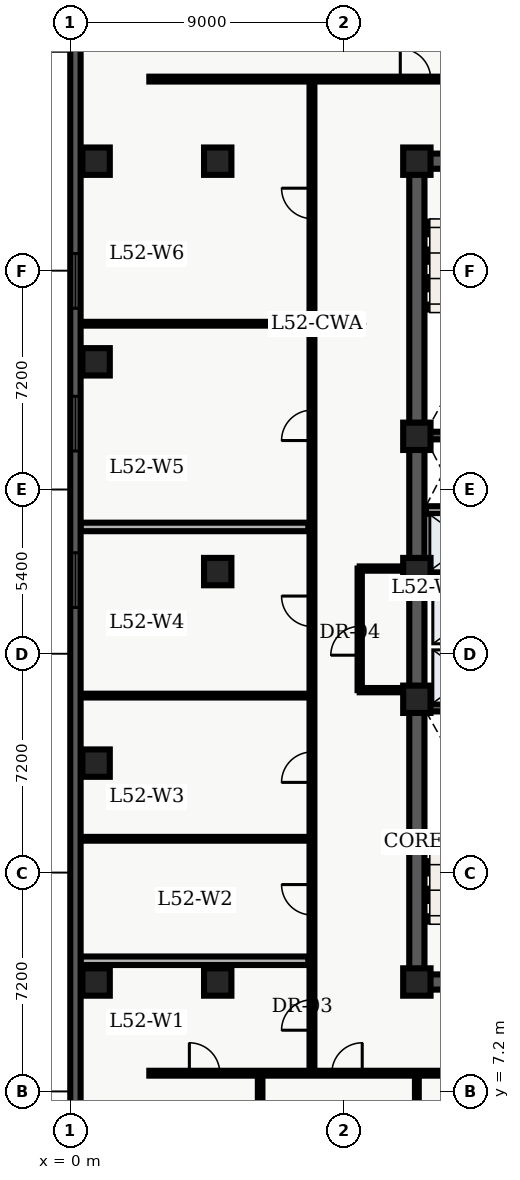
"""IFC4 building model, lengths in metres.
Left out: names, types, materials, properties, quantities, classifications, styles, units other than length and angle.
Written with IfcOpenShell. Run it as: python <this file> out.ifc"""

import sys

from ifc_helpers import new_model, entity, si_unit, converted_unit, direction, frame, origin_with_axes, origin_2d_with_axis, place, context, subcontext, project, spatial, polyline, rectangle, outline, extrude, element, fill, save


model = new_model("IFC4")
c1 = context("Model", 3, precision=1e-05, world=origin_with_axes(), true_north=direction((0.0, 1.0)))
c2 = subcontext(c1, "Body", "Model", "MODEL_VIEW")
j1 = project(units=[si_unit("LENGTHUNIT", "METRE"), converted_unit("PLANEANGLEUNIT", "DEGREE", entity("IfcPlaneAngleMeasure", 0.017), si_unit("PLANEANGLEUNIT", "RADIAN"), dimensions=[0, 0, 0, 0, 0, 0, 0])], contexts=[c1])
p1 = place(None, origin_with_axes())
s1 = spatial("IfcSite", under=j1, at=p1, CompositionType="ELEMENT")
p2 = place(p1, origin_with_axes())
s2 = spatial("IfcBuilding", under=s1, at=p2, CompositionType="ELEMENT")
p3 = place(p2, frame((0.0, 0.0, 212.1), z_axis=(0.0, 0.0, 1.0), x_axis=(1.0, 0.0, 0.0)))
s3 = spatial("IfcBuildingStorey", under=s2, at=p3, CompositionType="ELEMENT", Elevation=212.1)
p4 = place(p3, frame((11.4, 10.8, 0.0), z_axis=(0.0, 0.0, 1.0), x_axis=(0.0, 1.0, 0.0)))
e1 = element("IfcWall", 1, at=p4, inside=s3, PredefinedType="SHEAR", context=c2, shape_type="SweptSolid", body=[
    extrude(outline(polyline([(0.0, -0.25), (27.0, -0.25), (27.0, 0.25), (0.0, 0.25), (0.0, -0.25)])), origin_with_axes(), (0.0, 0.0, 1.0), 3.66),
])
p5 = place(p3, frame((11.4, 10.8, 0.0), z_axis=(0.0, 0.0, 1.0), x_axis=(1.0, 0.0, 0.0)))
e2 = element("IfcWall", 2, at=p5, inside=s3, PredefinedType="SHEAR", context=c2, shape_type="SweptSolid", body=[
    extrude(outline(polyline([(0.0, -0.25), (7.2, -0.25), (7.2, 0.25), (0.0, 0.25), (0.0, -0.25)])), origin_with_axes(), (0.0, 0.0, 1.0), 3.66),
])
p6 = place(p5, frame((2.625, 0.0, 0.0), z_axis=(0.0, 0.0, 1.0), x_axis=(1.0, 0.0, 0.0)))
e3 = element("IfcOpeningElement", 3, at=p6, cuts=e2, PredefinedType="OPENING", context=c2, shape_type="SweptSolid", body=[
    extrude(rectangle(XDim=1.05, YDim=0.52, at=origin_2d_with_axis()), origin_with_axes(), (0.0, 0.0, 1.0), 2.15),
])
p7 = place(p3, frame((11.4, 37.8, 0.0), z_axis=(0.0, 0.0, 1.0), x_axis=(1.0, 0.0, 0.0)))
e4 = element("IfcWall", 4, at=p7, inside=s3, PredefinedType="SHEAR", context=c2, shape_type="SweptSolid", body=[
    extrude(outline(polyline([(0.0, -0.25), (7.2, -0.25), (7.2, 0.25), (0.0, 0.25), (0.0, -0.25)])), origin_with_axes(), (0.0, 0.0, 1.0), 3.66),
])
p8 = place(p7, frame((2.625, 0.0, 0.0), z_axis=(0.0, 0.0, 1.0), x_axis=(1.0, 0.0, 0.0)))
e5 = element("IfcOpeningElement", 5, at=p8, cuts=e4, PredefinedType="OPENING", context=c2, shape_type="SweptSolid", body=[
    extrude(rectangle(XDim=1.05, YDim=0.52, at=origin_2d_with_axis()), origin_with_axes(), (0.0, 0.0, 1.0), 2.15),
])
for number, where, z_axis, x_axis in (
    (6, (11.65, 19.825, 0.0), (0.0, 0.0, 1.0), (1.0, 0.0, 0.0)),
    (7, (11.65, 28.775, 0.0), (0.0, 0.0, 1.0), (1.0, 0.0, 0.0)),
):
    element("IfcWall", number, at=place(p3, frame(where, z_axis=z_axis, x_axis=x_axis)), inside=s3, PredefinedType="SHEAR", context=c2, shape_type="SweptSolid", body=[
        extrude(outline(polyline([(0.0, -0.125), (6.7, -0.125), (6.7, 0.125), (0.0, 0.125), (0.0, -0.125)])), origin_with_axes(), (0.0, 0.0, 1.0), 3.66),
    ])
p9 = place(p3, frame((11.7, 24.1, 0.0), z_axis=(0.0, 0.0, 1.0), x_axis=(1.0, 0.0, 0.0)))
e8 = element("IfcWall", 8, at=p9, inside=s3, PredefinedType="SOLIDWALL", context=c2, shape_type="SweptSolid", body=[
    extrude(outline(polyline([(0.0, -0.125), (6.6, -0.125), (6.6, 0.125), (0.0, 0.125), (0.0, -0.125)])), origin_with_axes(), (0.0, 0.0, 1.0), 2.7),
])
p10 = place(p9, frame((3.75, 0.0, 0.0), z_axis=(0.0, 0.0, 1.0), x_axis=(1.0, 0.0, 0.0)))
e9 = element("IfcOpeningElement", 9, at=p10, cuts=e8, PredefinedType="OPENING", context=c2, shape_type="SweptSolid", body=[
    extrude(rectangle(XDim=0.9, YDim=0.27, at=origin_2d_with_axis()), origin_with_axes(), (0.0, 0.0, 1.0), 2.15),
])
p11 = place(p3, frame((11.7, 26.325, 0.0), z_axis=(0.0, 0.0, 1.0), x_axis=(1.0, 0.0, 0.0)))
e10 = element("IfcWall", 10, at=p11, inside=s3, PredefinedType="SOLIDWALL", context=c2, shape_type="SweptSolid", body=[
    extrude(outline(polyline([(0.0, -0.125), (6.6, -0.125), (6.6, 0.125), (0.0, 0.125), (0.0, -0.125)])), origin_with_axes(), (0.0, 0.0, 1.0), 2.7),
])
p12 = place(p11, frame((3.5, 0.0, 0.0), z_axis=(0.0, 0.0, 1.0), x_axis=(1.0, 0.0, 0.0)))
e11 = element("IfcOpeningElement", 11, at=p12, cuts=e10, PredefinedType="OPENING", context=c2, shape_type="SweptSolid", body=[
    extrude(rectangle(XDim=0.9, YDim=0.27, at=origin_2d_with_axis()), origin_with_axes(), (0.0, 0.0, 1.0), 2.15),
])
for number, where, z_axis, x_axis in (
    (12, (11.4, 10.8, 0.0), (0.0, 0.0, 1.0), (1.0, 0.0, 0.0)),
    (13, (11.4, 20.1, 0.0), (0.0, 0.0, 1.0), (1.0, 0.0, 0.0)),
    (14, (11.4, 24.3, 0.0), (0.0, 0.0, 1.0), (1.0, 0.0, 0.0)),
    (15, (11.4, 28.75, 0.0), (0.0, 0.0, 1.0), (1.0, 0.0, 0.0)),
    (16, (11.4, 37.8, 0.0), (0.0, 0.0, 1.0), (1.0, 0.0, 0.0)),
    (17, (4.85, 10.8, 0.0), (0.0, 0.0, 1.0), (1.0, 0.0, 0.0)),
    (18, (4.85, 24.3, 0.0), (0.0, 0.0, 1.0), (1.0, 0.0, 0.0)),
    (19, (4.85, 37.8, 0.0), (0.0, 0.0, 1.0), (1.0, 0.0, 0.0)),
    (20, (0.85, 10.8, 0.0), (0.0, 0.0, 1.0), (1.0, 0.0, 0.0)),
    (21, (0.85, 18.0, 0.0), (0.0, 0.0, 1.0), (1.0, 0.0, 0.0)),
    (22, (0.85, 31.2, 0.0), (0.0, 0.0, 1.0), (1.0, 0.0, 0.0)),
    (23, (0.85, 37.8, 0.0), (0.0, 0.0, 1.0), (1.0, 0.0, 0.0)),
):
    element("IfcColumn", number, at=place(p3, frame(where, z_axis=z_axis, x_axis=x_axis)), inside=s3, PredefinedType="COLUMN", context=c2, shape_type="SweptSolid", body=[
        extrude(rectangle(XDim=0.9, YDim=0.9, at=origin_2d_with_axis()), origin_with_axes(), (0.0, 0.0, 1.0), 3.9),
    ])
p13 = place(p3, frame((9.52, 20.4, 0.0), z_axis=(0.0, 0.0, 1.0), x_axis=(0.0, 1.0, 0.0)))
e24 = element("IfcWall", 24, at=p13, inside=s3, PredefinedType="PARTITIONING", context=c2, shape_type="SweptSolid", body=[
    extrude(outline(polyline([(0.0, -0.07), (4.0, -0.07), (4.0, 0.07), (0.0, 0.07), (0.0, -0.07)])), origin_with_axes(), (0.0, 0.0, 1.0), 2.7),
])
p14 = place(p13, frame((1.625, 0.0, 0.0), z_axis=(0.0, 0.0, 1.0), x_axis=(1.0, 0.0, 0.0)))
e25 = element("IfcOpeningElement", 25, at=p14, cuts=e24, PredefinedType="OPENING", context=c2, shape_type="SweptSolid", body=[
    extrude(rectangle(XDim=0.95, YDim=0.16, at=origin_2d_with_axis()), origin_with_axes(), (0.0, 0.0, 1.0), 2.15),
])
for number, where, z_axis, x_axis in (
    (26, (9.52, 20.4, 0.0), (0.0, 0.0, 1.0), (1.0, 0.0, 0.0)),
    (27, (9.52, 24.4, 0.0), (0.0, 0.0, 1.0), (1.0, 0.0, 0.0)),
):
    element("IfcWall", number, at=place(p3, frame(where, z_axis=z_axis, x_axis=x_axis)), inside=s3, PredefinedType="PARTITIONING", context=c2, shape_type="SweptSolid", body=[
        extrude(outline(polyline([(0.0, -0.07), (1.58, -0.07), (1.58, 0.07), (0.0, 0.07), (0.0, -0.07)])), origin_with_axes(), (0.0, 0.0, 1.0), 2.7),
    ])
p15 = place(p3, frame((2.6, 7.8, 0.0), z_axis=(0.0, 0.0, 1.0), x_axis=(1.0, 0.0, 0.0)))
e28 = element("IfcWall", 28, at=p15, inside=s3, PredefinedType="PARTITIONING", context=c2, shape_type="SweptSolid", body=[
    extrude(outline(polyline([(0.0, -0.08), (18.55, -0.08), (18.55, 0.08), (0.0, 0.08), (0.0, -0.08)])), origin_with_axes(), (0.0, 0.0, 1.0), 2.7),
])
p16 = place(p15, frame((1.817, 0.0, 0.0), z_axis=(0.0, 0.0, 1.0), x_axis=(1.0, 0.0, 0.0)))
e29 = element("IfcOpeningElement", 29, at=p16, cuts=e28, PredefinedType="OPENING", context=c2, shape_type="SweptSolid", body=[
    extrude(rectangle(XDim=1.0, YDim=0.18, at=origin_2d_with_axis()), origin_with_axes(), (0.0, 0.0, 1.0), 2.15),
])
p17 = place(p15, frame((6.503, 0.0, 0.0), z_axis=(0.0, 0.0, 1.0), x_axis=(1.0, 0.0, 0.0)))
e30 = element("IfcOpeningElement", 30, at=p17, cuts=e28, PredefinedType="OPENING", context=c2, shape_type="SweptSolid", body=[
    extrude(rectangle(XDim=1.0, YDim=0.18, at=origin_2d_with_axis()), origin_with_axes(), (0.0, 0.0, 1.0), 2.15),
])
p18 = place(p15, frame((10.728, 0.0, 0.0), z_axis=(0.0, 0.0, 1.0), x_axis=(1.0, 0.0, 0.0)))
e31 = element("IfcOpeningElement", 31, at=p18, cuts=e28, PredefinedType="OPENING", context=c2, shape_type="SweptSolid", body=[
    extrude(rectangle(XDim=1.0, YDim=0.18, at=origin_2d_with_axis()), origin_with_axes(), (0.0, 0.0, 1.0), 2.15),
])
p19 = place(p15, frame((15.578, 0.0, 0.0), z_axis=(0.0, 0.0, 1.0), x_axis=(1.0, 0.0, 0.0)))
e32 = element("IfcOpeningElement", 32, at=p19, cuts=e28, PredefinedType="OPENING", context=c2, shape_type="SweptSolid", body=[
    extrude(rectangle(XDim=1.2, YDim=0.18, at=origin_2d_with_axis()), origin_with_axes(), (0.0, 0.0, 1.0), 2.2),
])
p20 = place(p3, frame((2.6, 40.5, 0.0), z_axis=(0.0, 0.0, 1.0), x_axis=(1.0, 0.0, 0.0)))
e33 = element("IfcWall", 33, at=p20, inside=s3, PredefinedType="PARTITIONING", context=c2, shape_type="SweptSolid", body=[
    extrude(outline(polyline([(0.0, -0.08), (28.59, -0.08), (28.59, 0.08), (0.0, 0.08), (0.0, -0.08)])), origin_with_axes(), (0.0, 0.0, 1.0), 2.7),
])
p21 = place(p20, frame((8.755, 0.0, 0.0), z_axis=(0.0, 0.0, 1.0), x_axis=(1.0, 0.0, 0.0)))
e34 = element("IfcOpeningElement", 34, at=p21, cuts=e33, PredefinedType="OPENING", context=c2, shape_type="SweptSolid", body=[
    extrude(rectangle(XDim=1.0, YDim=0.18, at=origin_2d_with_axis()), origin_with_axes(), (0.0, 0.0, 1.0), 2.15),
])
p22 = place(p3, frame((7.95, 7.8, 0.0), z_axis=(0.0, 0.0, 1.0), x_axis=(0.0, 1.0, 0.0)))
e35 = element("IfcWall", 35, at=p22, inside=s3, PredefinedType="PARTITIONING", context=c2, shape_type="SweptSolid", body=[
    extrude(outline(polyline([(0.0, -0.08), (32.7, -0.08), (32.7, 0.08), (0.0, 0.08), (0.0, -0.08)])), origin_with_axes(), (0.0, 0.0, 1.0), 2.7),
])
p23 = place(p22, frame((1.915, 0.0, 0.0), z_axis=(0.0, 0.0, 1.0), x_axis=(1.0, 0.0, 0.0)))
e36 = element("IfcOpeningElement", 36, at=p23, cuts=e35, PredefinedType="OPENING", context=c2, shape_type="SweptSolid", body=[
    extrude(rectangle(XDim=1.0, YDim=0.18, at=origin_2d_with_axis()), origin_with_axes(), (0.0, 0.0, 1.0), 2.15),
])
p24 = place(p22, frame((5.705, 0.0, 0.0), z_axis=(0.0, 0.0, 1.0), x_axis=(1.0, 0.0, 0.0)))
e37 = element("IfcOpeningElement", 37, at=p24, cuts=e35, PredefinedType="OPENING", context=c2, shape_type="SweptSolid", body=[
    extrude(rectangle(XDim=1.0, YDim=0.18, at=origin_2d_with_axis()), origin_with_axes(), (0.0, 0.0, 1.0), 2.15),
])
p25 = place(p22, frame((10.066, 0.0, 0.0), z_axis=(0.0, 0.0, 1.0), x_axis=(1.0, 0.0, 0.0)))
e38 = element("IfcOpeningElement", 38, at=p25, cuts=e35, PredefinedType="OPENING", context=c2, shape_type="SweptSolid", body=[
    extrude(rectangle(XDim=1.0, YDim=0.18, at=origin_2d_with_axis()), origin_with_axes(), (0.0, 0.0, 1.0), 2.15),
])
p26 = place(p22, frame((15.195, 0.0, 0.0), z_axis=(0.0, 0.0, 1.0), x_axis=(1.0, 0.0, 0.0)))
e39 = element("IfcOpeningElement", 39, at=p26, cuts=e35, PredefinedType="OPENING", context=c2, shape_type="SweptSolid", body=[
    extrude(rectangle(XDim=1.0, YDim=0.18, at=origin_2d_with_axis()), origin_with_axes(), (0.0, 0.0, 1.0), 2.15),
])
p27 = place(p22, frame((21.311, 0.0, 0.0), z_axis=(0.0, 0.0, 1.0), x_axis=(1.0, 0.0, 0.0)))
e40 = element("IfcOpeningElement", 40, at=p27, cuts=e35, PredefinedType="OPENING", context=c2, shape_type="SweptSolid", body=[
    extrude(rectangle(XDim=1.0, YDim=0.18, at=origin_2d_with_axis()), origin_with_axes(), (0.0, 0.0, 1.0), 2.15),
])
p28 = place(p22, frame((28.611, 0.0, 0.0), z_axis=(0.0, 0.0, 1.0), x_axis=(1.0, 0.0, 0.0)))
e41 = element("IfcOpeningElement", 41, at=p28, cuts=e35, PredefinedType="OPENING", context=c2, shape_type="SweptSolid", body=[
    extrude(rectangle(XDim=1.0, YDim=0.18, at=origin_2d_with_axis()), origin_with_axes(), (0.0, 0.0, 1.0), 2.15),
])
p29 = place(p3, frame((0.335, 11.499, 0.0), z_axis=(0.0, 0.0, 1.0), x_axis=(1.0, 0.0, 0.0)))
e42 = element("IfcWall", 42, at=p29, inside=s3, PredefinedType="PARTITIONING", context=c2, shape_type="SweptSolid", body=[
    extrude(outline(polyline([(0.0, -0.14), (7.495, -0.14), (7.495, 0.14), (0.0, 0.14), (0.0, -0.14)])), origin_with_axes(), (0.0, 0.0, 1.0), 2.7),
])
for number, where, z_axis, x_axis in (
    (43, (0.335, 15.511, 0.0), (0.0, 0.0, 1.0), (1.0, 0.0, 0.0)),
    (44, (0.335, 20.221, 0.0), (0.0, 0.0, 1.0), (1.0, 0.0, 0.0)),
):
    element("IfcWall", number, at=place(p3, frame(where, z_axis=z_axis, x_axis=x_axis)), inside=s3, PredefinedType="PARTITIONING", context=c2, shape_type="SweptSolid", body=[
        extrude(outline(polyline([(0.0, -0.062), (7.495, -0.062), (7.495, 0.062), (0.0, 0.062), (0.0, -0.062)])), origin_with_axes(), (0.0, 0.0, 1.0), 2.7),
    ])
p30 = place(p3, frame((0.335, 25.769, 0.0), z_axis=(0.0, 0.0, 1.0), x_axis=(1.0, 0.0, 0.0)))
e45 = element("IfcWall", 45, at=p30, inside=s3, PredefinedType="PARTITIONING", context=c2, shape_type="SweptSolid", body=[
    extrude(outline(polyline([(0.0, -0.14), (7.495, -0.14), (7.495, 0.14), (0.0, 0.14), (0.0, -0.14)])), origin_with_axes(), (0.0, 0.0, 1.0), 2.7),
])
p31 = place(p3, frame((0.335, 32.453, 0.0), z_axis=(0.0, 0.0, 1.0), x_axis=(1.0, 0.0, 0.0)))
e46 = element("IfcWall", 46, at=p31, inside=s3, PredefinedType="PARTITIONING", context=c2, shape_type="SweptSolid", body=[
    extrude(outline(polyline([(0.0, -0.062), (7.495, -0.062), (7.495, 0.062), (0.0, 0.062), (0.0, -0.062)])), origin_with_axes(), (0.0, 0.0, 1.0), 2.7),
])
p32 = place(p3, frame((6.245, 0.335, 0.0), z_axis=(0.0, 0.0, 1.0), x_axis=(0.0, 1.0, 0.0)))
e47 = element("IfcWall", 47, at=p32, inside=s3, PredefinedType="PARTITIONING", context=c2, shape_type="SweptSolid", body=[
    extrude(outline(polyline([(0.0, -0.075), (7.365, -0.075), (7.365, 0.075), (0.0, 0.075), (0.0, -0.075)])), origin_with_axes(), (0.0, 0.0, 1.0), 2.7),
])
p33 = place(p3, frame((11.4, 0.335, 0.0), z_axis=(0.0, 0.0, 1.0), x_axis=(0.0, 1.0, 0.0)))
e48 = element("IfcWall", 48, at=p33, inside=s3, PredefinedType="PARTITIONING", context=c2, shape_type="SweptSolid", body=[
    extrude(outline(polyline([(0.0, -0.062), (7.365, -0.062), (7.365, 0.062), (0.0, 0.062), (0.0, -0.062)])), origin_with_axes(), (0.0, 0.0, 1.0), 2.7),
])
p34 = place(p3, frame((0.17, 2.74, 0.0), z_axis=(0.0, 0.0, 1.0), x_axis=(0.0, 1.0, 0.0)))
e49 = element("IfcWall", 49, at=p34, inside=s3, PredefinedType="SOLIDWALL", context=c2, shape_type="SweptSolid", body=[
    extrude(outline(polyline([(0.0, -0.17), (43.46, -0.17), (43.46, 0.17), (0.0, 0.17), (0.0, -0.17)])), origin_with_axes(), (0.0, 0.0, 1.0), 3.66),
])
p35 = place(p34, frame((2.948, 0.0, 0.45), z_axis=(0.0, 0.0, 1.0), x_axis=(1.0, 0.0, 0.0)))
e50 = element("IfcOpeningElement", 50, at=p35, cuts=e49, PredefinedType="OPENING", context=c2, shape_type="SweptSolid", body=[
    extrude(rectangle(XDim=1.8, YDim=0.36, at=origin_2d_with_axis()), origin_with_axes(), (0.0, 0.0, 1.0), 2.1),
])
p36 = place(p34, frame((21.28, 0.0, 0.45), z_axis=(0.0, 0.0, 1.0), x_axis=(1.0, 0.0, 0.0)))
e51 = element("IfcOpeningElement", 51, at=p36, cuts=e49, PredefinedType="OPENING", context=c2, shape_type="SweptSolid", body=[
    extrude(rectangle(XDim=1.8, YDim=0.36, at=origin_2d_with_axis()), origin_with_axes(), (0.0, 0.0, 1.0), 2.1),
])
p37 = place(p34, frame((26.426, 0.0, 0.45), z_axis=(0.0, 0.0, 1.0), x_axis=(1.0, 0.0, 0.0)))
e52 = element("IfcOpeningElement", 52, at=p37, cuts=e49, PredefinedType="OPENING", context=c2, shape_type="SweptSolid", body=[
    extrude(rectangle(XDim=1.8, YDim=0.36, at=origin_2d_with_axis()), origin_with_axes(), (0.0, 0.0, 1.0), 2.1),
])
p38 = place(p34, frame((31.121, 0.0, 0.45), z_axis=(0.0, 0.0, 1.0), x_axis=(1.0, 0.0, 0.0)))
e53 = element("IfcOpeningElement", 53, at=p38, cuts=e49, PredefinedType="OPENING", context=c2, shape_type="SweptSolid", body=[
    extrude(rectangle(XDim=1.8, YDim=0.36, at=origin_2d_with_axis()), origin_with_axes(), (0.0, 0.0, 1.0), 2.1),
])
p39 = place(p34, frame((40.062, 0.0, 0.45), z_axis=(0.0, 0.0, 1.0), x_axis=(1.0, 0.0, 0.0)))
e54 = element("IfcOpeningElement", 54, at=p39, cuts=e49, PredefinedType="OPENING", context=c2, shape_type="SweptSolid", body=[
    extrude(rectangle(XDim=1.8, YDim=0.36, at=origin_2d_with_axis()), origin_with_axes(), (0.0, 0.0, 1.0), 2.1),
])
p40 = place(p13, frame((1.625, 0.0, 0.0), z_axis=(0.0, 0.0, 1.0), x_axis=(1.0, 0.0, 0.0)))
e55 = element("IfcDoor", 55, at=p40, inside=s3, OperationType="SINGLE_SWING_LEFT", PredefinedType="DOOR", context=c2, shape_type="SweptSolid", body=[
    extrude(rectangle(XDim=0.95, YDim=0.084, at=origin_2d_with_axis()), origin_with_axes(), (0.0, 0.0, 1.0), 2.15),
])
fill(e25, e55)
p41 = place(p22, frame((1.915, 0.0, 0.0), z_axis=(0.0, 0.0, 1.0), x_axis=(1.0, 0.0, 0.0)))
e56 = element("IfcDoor", 56, at=p41, inside=s3, OperationType="SINGLE_SWING_LEFT", PredefinedType="DOOR", context=c2, shape_type="SweptSolid", body=[
    extrude(rectangle(XDim=1.0, YDim=0.09, at=origin_2d_with_axis()), origin_with_axes(), (0.0, 0.0, 1.0), 2.15),
])
fill(e36, e56)
p42 = place(p22, frame((5.705, 0.0, 0.0), z_axis=(0.0, 0.0, 1.0), x_axis=(1.0, 0.0, 0.0)))
e57 = element("IfcDoor", 57, at=p42, inside=s3, OperationType="SINGLE_SWING_RIGHT", PredefinedType="DOOR", context=c2, shape_type="SweptSolid", body=[
    extrude(rectangle(XDim=1.0, YDim=0.09, at=origin_2d_with_axis()), origin_with_axes(), (0.0, 0.0, 1.0), 2.15),
])
fill(e37, e57)
p43 = place(p22, frame((10.066, 0.0, 0.0), z_axis=(0.0, 0.0, 1.0), x_axis=(1.0, 0.0, 0.0)))
e58 = element("IfcDoor", 58, at=p43, inside=s3, OperationType="SINGLE_SWING_LEFT", PredefinedType="DOOR", context=c2, shape_type="SweptSolid", body=[
    extrude(rectangle(XDim=1.0, YDim=0.09, at=origin_2d_with_axis()), origin_with_axes(), (0.0, 0.0, 1.0), 2.15),
])
fill(e38, e58)
p44 = place(p22, frame((15.195, 0.0, 0.0), z_axis=(0.0, 0.0, 1.0), x_axis=(1.0, 0.0, 0.0)))
e59 = element("IfcDoor", 59, at=p44, inside=s3, OperationType="SINGLE_SWING_RIGHT", PredefinedType="DOOR", context=c2, shape_type="SweptSolid", body=[
    extrude(rectangle(XDim=1.0, YDim=0.09, at=origin_2d_with_axis()), origin_with_axes(), (0.0, 0.0, 1.0), 2.15),
])
fill(e39, e59)
p45 = place(p22, frame((21.311, 0.0, 0.0), z_axis=(0.0, 0.0, 1.0), x_axis=(1.0, 0.0, 0.0)))
e60 = element("IfcDoor", 60, at=p45, inside=s3, OperationType="SINGLE_SWING_LEFT", PredefinedType="DOOR", context=c2, shape_type="SweptSolid", body=[
    extrude(rectangle(XDim=1.0, YDim=0.09, at=origin_2d_with_axis()), origin_with_axes(), (0.0, 0.0, 1.0), 2.15),
])
fill(e40, e60)
p46 = place(p22, frame((28.611, 0.0, 0.0), z_axis=(0.0, 0.0, 1.0), x_axis=(1.0, 0.0, 0.0)))
e61 = element("IfcDoor", 61, at=p46, inside=s3, OperationType="SINGLE_SWING_RIGHT", PredefinedType="DOOR", context=c2, shape_type="SweptSolid", body=[
    extrude(rectangle(XDim=1.0, YDim=0.09, at=origin_2d_with_axis()), origin_with_axes(), (0.0, 0.0, 1.0), 2.15),
])
fill(e41, e61)
p47 = place(p15, frame((1.817, 0.0, 0.0), z_axis=(0.0, 0.0, 1.0), x_axis=(1.0, 0.0, 0.0)))
e62 = element("IfcDoor", 62, at=p47, inside=s3, OperationType="SINGLE_SWING_LEFT", PredefinedType="DOOR", context=c2, shape_type="SweptSolid", body=[
    extrude(rectangle(XDim=1.0, YDim=0.09, at=origin_2d_with_axis()), origin_with_axes(), (0.0, 0.0, 1.0), 2.15),
])
fill(e29, e62)
p48 = place(p15, frame((6.503, 0.0, 0.0), z_axis=(0.0, 0.0, 1.0), x_axis=(1.0, 0.0, 0.0)))
e63 = element("IfcDoor", 63, at=p48, inside=s3, OperationType="SINGLE_SWING_RIGHT", PredefinedType="DOOR", context=c2, shape_type="SweptSolid", body=[
    extrude(rectangle(XDim=1.0, YDim=0.09, at=origin_2d_with_axis()), origin_with_axes(), (0.0, 0.0, 1.0), 2.15),
])
fill(e30, e63)
p49 = place(p20, frame((8.755, 0.0, 0.0), z_axis=(0.0, 0.0, 1.0), x_axis=(1.0, 0.0, 0.0)))
e64 = element("IfcDoor", 64, at=p49, inside=s3, OperationType="SINGLE_SWING_LEFT", PredefinedType="DOOR", context=c2, shape_type="SweptSolid", body=[
    extrude(rectangle(XDim=1.0, YDim=0.09, at=origin_2d_with_axis()), origin_with_axes(), (0.0, 0.0, 1.0), 2.15),
])
fill(e34, e64)
p50 = place(p34, frame((21.28, 0.0, 0.45), z_axis=(0.0, 0.0, 1.0), x_axis=(1.0, 0.0, 0.0)))
e65 = element("IfcWindow", 65, at=p50, inside=s3, PredefinedType="WINDOW", context=c2, shape_type="SweptSolid", body=[
    extrude(rectangle(XDim=1.8, YDim=0.09, at=origin_2d_with_axis()), origin_with_axes(), (0.0, 0.0, 1.0), 2.1),
])
fill(e51, e65)
p51 = place(p34, frame((26.426, 0.0, 0.45), z_axis=(0.0, 0.0, 1.0), x_axis=(1.0, 0.0, 0.0)))
e66 = element("IfcWindow", 66, at=p51, inside=s3, PredefinedType="WINDOW", context=c2, shape_type="SweptSolid", body=[
    extrude(rectangle(XDim=1.8, YDim=0.09, at=origin_2d_with_axis()), origin_with_axes(), (0.0, 0.0, 1.0), 2.1),
])
fill(e52, e66)
p52 = place(p34, frame((31.121, 0.0, 0.45), z_axis=(0.0, 0.0, 1.0), x_axis=(1.0, 0.0, 0.0)))
e67 = element("IfcWindow", 67, at=p52, inside=s3, PredefinedType="WINDOW", context=c2, shape_type="SweptSolid", body=[
    extrude(rectangle(XDim=1.8, YDim=0.09, at=origin_2d_with_axis()), origin_with_axes(), (0.0, 0.0, 1.0), 2.1),
])
fill(e53, e67)
save(model, sys.argv[1])
